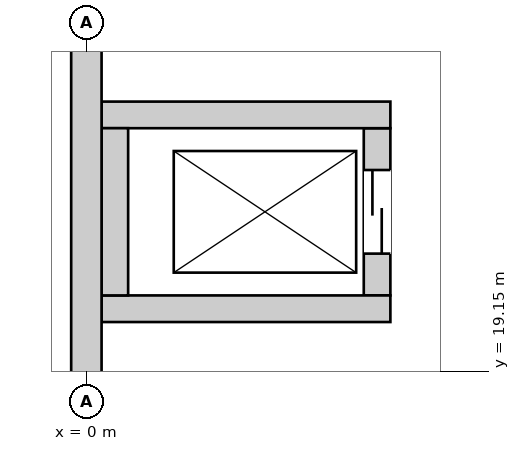
"""IFC4 building model, lengths in metres.
Left out: names, types, materials, properties, quantities, classifications, styles, units other than length and angle.
Written with IfcOpenShell. Run it as: python <this file> out.ifc"""

import sys

from ifc_helpers import new_model, si_unit, direction, frame, frame_2d, origin, place, context, subcontext, project, spatial, rectangle, extrude, element, fill, save


model = new_model("IFC4")
c1 = context("Model", 3, precision=1e-05, world=origin(), true_north=direction((0.0, 1.0)))
c2 = subcontext(c1, "Body", "Model", "MODEL_VIEW")
j1 = project(units=[si_unit("LENGTHUNIT", "METRE"), si_unit("PLANEANGLEUNIT", "RADIAN")], contexts=[c1])
p1 = place(None, origin())
s1 = spatial("IfcSite", under=j1, at=p1, CompositionType="ELEMENT")
p2 = place(p1, origin())
s2 = spatial("IfcBuilding", under=s1, at=p2, CompositionType="ELEMENT")
p3 = place(p2, origin())
s3 = spatial("IfcBuildingStorey", under=s2, at=p3, CompositionType="ELEMENT", Elevation=0.0)
p4 = place(p3, frame((0.0, -0.2, 0.0), z_axis=(0.0, 0.0, 1.0), x_axis=(0.0, 1.0, 0.0)))
e1 = element("IfcWall", 1, at=p4, inside=s3, PredefinedType="SHEAR", context=c2, shape_type="SweptSolid", body=[
    extrude(rectangle(XDim=46.88, YDim=0.4, at=frame_2d((23.44, 0.0))), origin(), (0.0, 0.0, 1.0), 6.5),
])
p5 = place(p4, frame((7.125, 0.0, 0.0)))
e2 = element("IfcOpeningElement", 2, at=p5, cuts=e1, PredefinedType="OPENING", context=c2, shape_type="SweptSolid", body=[
    extrude(rectangle(XDim=3.0, YDim=2.4, at=frame_2d((1.5, 1.2))), frame((0.0, 0.21, 0.0), z_axis=(0.0, -1.0, 0.0), x_axis=(1.0, 0.0, 0.0)), (0.0, 0.0, 1.0), 0.42),
])
p6 = place(p4, frame((38.2, 0.0, 0.0)))
e3 = element("IfcOpeningElement", 3, at=p6, cuts=e1, PredefinedType="OPENING", context=c2, shape_type="SweptSolid", body=[
    extrude(rectangle(XDim=3.0, YDim=2.4, at=frame_2d((1.5, 1.2))), frame((0.0, 0.21, 0.0), z_axis=(0.0, -1.0, 0.0), x_axis=(1.0, 0.0, 0.0)), (0.0, 0.0, 1.0), 0.42),
])
for number, where, z_axis, x_axis in (
    (4, (0.2, 19.975, 0.0), (0.0, 0.0, 1.0), (1.0, 0.0, 0.0)),
    (5, (0.2, 22.525, 0.0), (0.0, 0.0, 1.0), (1.0, 0.0, 0.0)),
):
    element("IfcWall", number, at=place(p3, frame(where, z_axis=z_axis, x_axis=x_axis)), inside=s3, PredefinedType="SHEAR", context=c2, shape_type="SweptSolid", body=[
        extrude(rectangle(XDim=3.8, YDim=0.35, at=frame_2d((1.9, 0.0))), origin(), (0.0, 0.0, 1.0), 6.5),
    ])
p7 = place(p3, frame((0.375, 20.15, 0.0), z_axis=(0.0, 0.0, 1.0), x_axis=(0.0, 1.0, 0.0)))
e6 = element("IfcWall", 6, at=p7, inside=s3, PredefinedType="SHEAR", context=c2, shape_type="SweptSolid", body=[
    extrude(rectangle(XDim=2.2, YDim=0.35, at=frame_2d((1.1, 0.0))), origin(), (0.0, 0.0, 1.0), 6.5),
])
p8 = place(p3, frame((3.825, 20.15, 0.0), z_axis=(0.0, 0.0, 1.0), x_axis=(0.0, 1.0, 0.0)))
e7 = element("IfcWall", 7, at=p8, inside=s3, PredefinedType="SHEAR", context=c2, shape_type="SweptSolid", body=[
    extrude(rectangle(XDim=2.2, YDim=0.35, at=frame_2d((1.1, 0.0))), origin(), (0.0, 0.0, 1.0), 6.5),
])
p9 = place(p8, frame((0.55, 0.0, 0.0)))
e8 = element("IfcOpeningElement", 8, at=p9, cuts=e7, PredefinedType="OPENING", context=c2, shape_type="SweptSolid", body=[
    extrude(rectangle(XDim=1.1, YDim=2.1, at=frame_2d((0.55, 1.05))), frame((0.0, 0.185, 0.0), z_axis=(0.0, -1.0, 0.0), x_axis=(1.0, 0.0, 0.0)), (0.0, 0.0, 1.0), 0.37),
])
p10 = place(p9, origin())
e9 = element("IfcDoor", 9, at=p10, inside=s3, OperationType="DOUBLE_DOOR_SLIDING", PredefinedType="DOOR", context=c2, shape_type="SweptSolid", body=[
    extrude(rectangle(XDim=1.1, YDim=2.1, at=frame_2d((0.55, 1.05))), frame((0.0, 0.025, 0.0), z_axis=(0.0, -1.0, 0.0), x_axis=(1.0, 0.0, 0.0)), (0.0, 0.0, 1.0), 0.05),
])
fill(e8, e9)
save(model, sys.argv[1])
